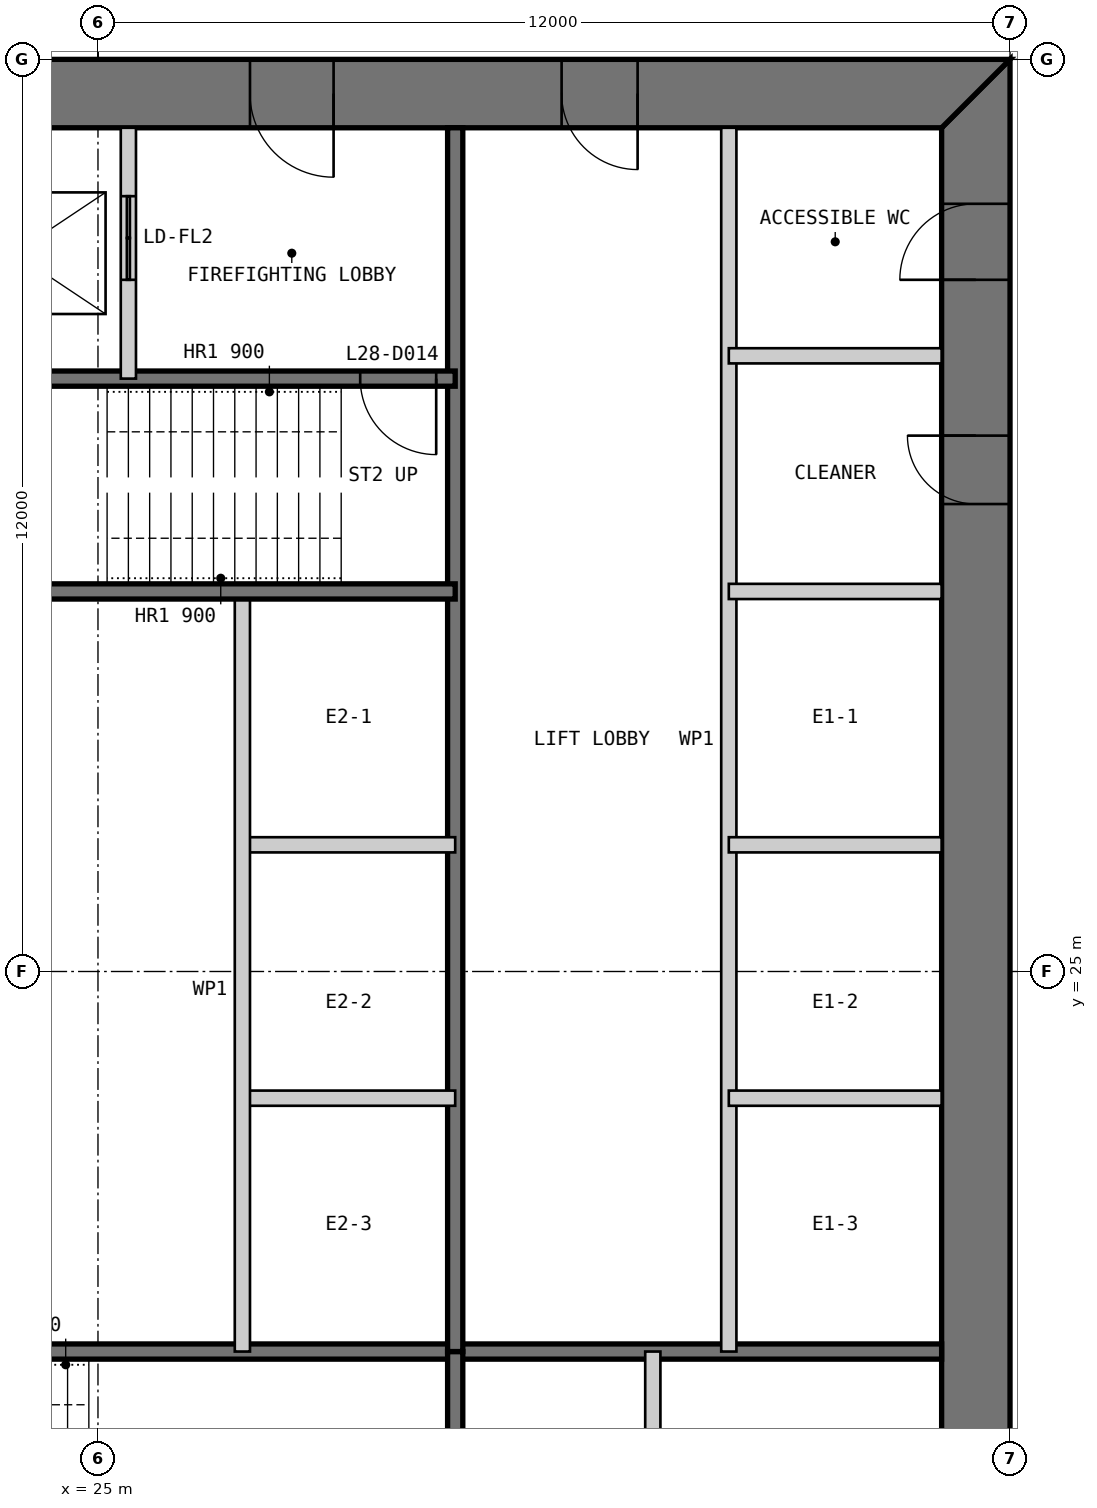
"""IFC4 building model, lengths in metres.
Left out: names, types, materials, properties, quantities, classifications, styles, units other than length and angle.
Written with IfcOpenShell. Run it as: python <this file> out.ifc"""

import sys

from ifc_helpers import new_model, si_unit, direction, frame, frame_2d, origin, place, context, subcontext, project, spatial, polyline, rectangle, outline, extrude, element, fill, save


model = new_model("IFC4")
c1 = context("Model", 3, precision=1e-05, world=origin(), true_north=direction((0.0, 1.0)))
c2 = subcontext(c1, "Body", "Model", "MODEL_VIEW")
j1 = project(units=[si_unit("LENGTHUNIT", "METRE"), si_unit("PLANEANGLEUNIT", "RADIAN")], contexts=[c1])
p1 = place(None, origin())
s1 = spatial("IfcSite", under=j1, at=p1, CompositionType="ELEMENT")
p2 = place(p1, origin())
s2 = spatial("IfcBuilding", under=s1, at=p2, CompositionType="ELEMENT")
p3 = place(p2, frame((0.0, 0.0, 122.4)))
s3 = spatial("IfcBuildingStorey", under=s2, at=p3, CompositionType="ELEMENT", Elevation=122.4)
p4 = place(p3, frame((36.55, 13.9, 0.0), z_axis=(0.0, 0.0, 1.0), x_axis=(0.0, 1.0, 0.0)))
e1 = element("IfcWall", 1, at=p4, inside=s3, PredefinedType="SHEAR", context=c2, shape_type="SweptSolid", body=[
    extrude(outline(polyline([(-0.9, -0.45), (23.1, -0.45), (22.2, 0.45), (0.0, 0.45), (-0.9, -0.45)])), origin(), (0.0, 0.0, 1.0), 4.0),
])
p5 = place(p4, frame((20.2, 0.0, 0.0)))
e2 = element("IfcOpeningElement", 2, at=p5, cuts=e1, PredefinedType="OPENING", context=c2, shape_type="SweptSolid", body=[
    extrude(rectangle(XDim=1.0, YDim=2.2, at=frame_2d((0.5, 1.1))), frame((0.0, 0.46, 0.0), z_axis=(0.0, -1.0, 0.0), x_axis=(1.0, 0.0, 0.0)), (0.0, 0.0, 1.0), 0.92),
])
p6 = place(p4, frame((17.25, 0.0, 0.0)))
e3 = element("IfcOpeningElement", 3, at=p6, cuts=e1, PredefinedType="OPENING", context=c2, shape_type="SweptSolid", body=[
    extrude(rectangle(XDim=0.9, YDim=2.2, at=frame_2d((0.45, 1.1))), frame((0.0, 0.46, 0.0), z_axis=(0.0, -1.0, 0.0), x_axis=(1.0, 0.0, 0.0)), (0.0, 0.0, 1.0), 0.92),
])
p7 = place(p3, frame((37.0, 36.55, 0.0), z_axis=(0.0, 0.0, 1.0), x_axis=(-1.0, 0.0, 0.0)))
e4 = element("IfcWall", 4, at=p7, inside=s3, PredefinedType="SHEAR", context=c2, shape_type="SweptSolid", body=[
    extrude(outline(polyline([(0.0, -0.45), (24.0, -0.45), (23.1, 0.45), (0.9, 0.45), (0.0, -0.45)])), origin(), (0.0, 0.0, 1.0), 4.0),
])
p8 = place(p7, frame((4.9, 0.0, 0.0)))
e5 = element("IfcOpeningElement", 5, at=p8, cuts=e4, PredefinedType="OPENING", context=c2, shape_type="SweptSolid", body=[
    extrude(rectangle(XDim=1.0, YDim=2.2, at=frame_2d((0.5, 1.1))), frame((0.0, 0.46, 0.0), z_axis=(0.0, -1.0, 0.0), x_axis=(1.0, 0.0, 0.0)), (0.0, 0.0, 1.0), 0.92),
])
p9 = place(p7, frame((8.9, 0.0, 0.0)))
e6 = element("IfcOpeningElement", 6, at=p9, cuts=e4, PredefinedType="OPENING", context=c2, shape_type="SweptSolid", body=[
    extrude(rectangle(XDim=1.1, YDim=2.2, at=frame_2d((0.55, 1.1))), frame((0.0, 0.46, 0.0), z_axis=(0.0, -1.0, 0.0), x_axis=(1.0, 0.0, 0.0)), (0.0, 0.0, 1.0), 0.92),
])
p10 = place(p7, frame((15.05, 0.0, 0.0)))
e7 = element("IfcOpeningElement", 7, at=p10, cuts=e4, PredefinedType="OPENING", context=c2, shape_type="SweptSolid", body=[
    extrude(rectangle(XDim=0.9, YDim=2.2, at=frame_2d((0.45, 1.1))), frame((0.0, 0.46, 0.0), z_axis=(0.0, -1.0, 0.0), x_axis=(1.0, 0.0, 0.0)), (0.0, 0.0, 1.0), 0.92),
])
p11 = place(p7, frame((17.9, 0.0, 0.0)))
e8 = element("IfcOpeningElement", 8, at=p11, cuts=e4, PredefinedType="OPENING", context=c2, shape_type="SweptSolid", body=[
    extrude(rectangle(XDim=1.0, YDim=2.2, at=frame_2d((0.5, 1.1))), frame((0.0, 0.46, 0.0), z_axis=(0.0, -1.0, 0.0), x_axis=(1.0, 0.0, 0.0)), (0.0, 0.0, 1.0), 0.92),
])
p12 = place(p7, frame((21.4, 0.0, 0.0)))
e9 = element("IfcOpeningElement", 9, at=p12, cuts=e4, PredefinedType="OPENING", context=c2, shape_type="SweptSolid", body=[
    extrude(rectangle(XDim=1.0, YDim=2.2, at=frame_2d((0.5, 1.1))), frame((0.0, 0.46, 0.0), z_axis=(0.0, -1.0, 0.0), x_axis=(1.0, 0.0, 0.0)), (0.0, 0.0, 1.0), 0.92),
])
p13 = place(p3, frame((20.3, 20.0, 0.0), z_axis=(0.0, 0.0, 1.0), x_axis=(1.0, 0.0, 0.0)))
e10 = element("IfcWall", 10, at=p13, inside=s3, PredefinedType="SOLIDWALL", context=c2, shape_type="SweptSolid", body=[
    extrude(rectangle(XDim=15.8, YDim=0.2, at=frame_2d((7.9, 0.0))), origin(), (0.0, 0.0, 1.0), 3.8),
])
p14 = place(p3, frame((29.7, 13.9, 0.0), z_axis=(0.0, 0.0, 1.0), x_axis=(0.0, 1.0, 0.0)))
e11 = element("IfcWall", 11, at=p14, inside=s3, PredefinedType="SOLIDWALL", context=c2, shape_type="SweptSolid", body=[
    extrude(rectangle(XDim=6.1, YDim=0.2, at=frame_2d((3.05, 0.0))), origin(), (0.0, 0.0, 1.0), 3.8),
])
p15 = place(p3, frame((32.3, 13.9, 0.0), z_axis=(0.0, 0.0, 1.0), x_axis=(0.0, 1.0, 0.0)))
e12 = element("IfcWall", 12, at=p15, inside=s3, PredefinedType="PARTITIONING", context=c2, shape_type="SweptSolid", body=[
    extrude(rectangle(XDim=6.1, YDim=0.2, at=frame_2d((3.05, 0.0))), origin(), (0.0, 0.0, 1.0), 3.8),
])
p16 = place(p3, frame((33.3, 36.1, 0.0), z_axis=(0.0, 0.0, 1.0), x_axis=(0.0, -1.0, 0.0)))
e13 = element("IfcWall", 13, at=p16, inside=s3, PredefinedType="PARTITIONING", context=c2, shape_type="SweptSolid", body=[
    extrude(rectangle(XDim=16.1, YDim=0.2, at=frame_2d((8.05, 0.0))), origin(), (0.0, 0.0, 1.0), 3.8),
])
p17 = place(p3, frame((29.7, 36.1, 0.0), z_axis=(0.0, 0.0, 1.0), x_axis=(0.0, -1.0, 0.0)))
e14 = element("IfcWall", 14, at=p17, inside=s3, PredefinedType="SOLIDWALL", context=c2, shape_type="SweptSolid", body=[
    extrude(rectangle(XDim=16.1, YDim=0.2, at=frame_2d((8.05, 0.0))), origin(), (0.0, 0.0, 1.0), 3.8),
])
for number, where, z_axis, x_axis in (
    (15, (36.1, 30.0, 0.0), (0.0, 0.0, 1.0), (-1.0, 0.0, 0.0)),
    (16, (36.1, 26.667, 0.0), (0.0, 0.0, 1.0), (-1.0, 0.0, 0.0)),
    (17, (36.1, 23.333, 0.0), (0.0, 0.0, 1.0), (-1.0, 0.0, 0.0)),
    (18, (29.7, 26.667, 0.0), (0.0, 0.0, 1.0), (-1.0, 0.0, 0.0)),
    (19, (29.7, 23.333, 0.0), (0.0, 0.0, 1.0), (-1.0, 0.0, 0.0)),
):
    element("IfcWall", number, at=place(p3, frame(where, z_axis=z_axis, x_axis=x_axis)), inside=s3, PredefinedType="PARTITIONING", context=c2, shape_type="SweptSolid", body=[
        extrude(rectangle(XDim=2.8, YDim=0.2, at=frame_2d((1.4, 0.0))), origin(), (0.0, 0.0, 1.0), 3.8),
    ])
p18 = place(p3, frame((26.9, 30.0, 0.0), z_axis=(0.0, 0.0, 1.0), x_axis=(0.0, -1.0, 0.0)))
e20 = element("IfcWall", 20, at=p18, inside=s3, PredefinedType="PARTITIONING", context=c2, shape_type="SweptSolid", body=[
    extrude(rectangle(XDim=10.0, YDim=0.2, at=frame_2d((5.0, 0.0))), origin(), (0.0, 0.0, 1.0), 3.8),
])
p19 = place(p3, frame((29.7, 32.8, 0.0), z_axis=(0.0, 0.0, 1.0), x_axis=(-1.0, 0.0, 0.0)))
e21 = element("IfcWall", 21, at=p19, inside=s3, PredefinedType="SOLIDWALL", context=c2, shape_type="SweptSolid", body=[
    extrude(rectangle(XDim=9.4, YDim=0.2, at=frame_2d((4.7, 0.0))), origin(), (0.0, 0.0, 1.0), 3.8),
])
p20 = place(p19, frame((0.25, 0.0, 0.0)))
e22 = element("IfcOpeningElement", 22, at=p20, cuts=e21, PredefinedType="OPENING", context=c2, shape_type="SweptSolid", body=[
    extrude(rectangle(XDim=1.0, YDim=2.2, at=frame_2d((0.5, 1.1))), frame((0.0, 0.11, 0.0), z_axis=(0.0, -1.0, 0.0), x_axis=(1.0, 0.0, 0.0)), (0.0, 0.0, 1.0), 0.22),
])
p21 = place(p3, frame((29.7, 30.0, 0.0), z_axis=(0.0, 0.0, 1.0), x_axis=(-1.0, 0.0, 0.0)))
e23 = element("IfcWall", 23, at=p21, inside=s3, PredefinedType="SOLIDWALL", context=c2, shape_type="SweptSolid", body=[
    extrude(rectangle(XDim=15.8, YDim=0.2, at=frame_2d((7.9, 0.0))), origin(), (0.0, 0.0, 1.0), 3.8),
])
p22 = place(p3, frame((25.4, 36.1, 0.0), z_axis=(0.0, 0.0, 1.0), x_axis=(0.0, -1.0, 0.0)))
e24 = element("IfcWall", 24, at=p22, inside=s3, PredefinedType="PARTITIONING", context=c2, shape_type="SweptSolid", body=[
    extrude(rectangle(XDim=3.3, YDim=0.2, at=frame_2d((1.65, 0.0))), origin(), (0.0, 0.0, 1.0), 3.8),
])
p23 = place(p22, frame((0.9, 0.0, 0.0)))
e25 = element("IfcOpeningElement", 25, at=p23, cuts=e24, PredefinedType="OPENING", context=c2, shape_type="SweptSolid", body=[
    extrude(rectangle(XDim=1.1, YDim=2.2, at=frame_2d((0.55, 1.1))), frame((0.0, 0.11, 0.0), z_axis=(0.0, -1.0, 0.0), x_axis=(1.0, 0.0, 0.0)), (0.0, 0.0, 1.0), 0.22),
])
p24 = place(p3, frame((36.1, 33.1, 0.0), z_axis=(0.0, 0.0, 1.0), x_axis=(-1.0, 0.0, 0.0)))
e26 = element("IfcWall", 26, at=p24, inside=s3, PredefinedType="PARTITIONING", context=c2, shape_type="SweptSolid", body=[
    extrude(rectangle(XDim=2.8, YDim=0.2, at=frame_2d((1.4, 0.0))), origin(), (0.0, 0.0, 1.0), 3.8),
])
p25 = place(p8, origin())
e27 = element("IfcDoor", 27, at=p25, inside=s3, OperationType="SINGLE_SWING_LEFT", PredefinedType="DOOR", context=c2, shape_type="SweptSolid", body=[
    extrude(rectangle(XDim=1.0, YDim=2.2, at=frame_2d((0.5, 1.1))), frame((0.0, 0.025, 0.0), z_axis=(0.0, -1.0, 0.0), x_axis=(1.0, 0.0, 0.0)), (0.0, 0.0, 1.0), 0.05),
    extrude(outline(polyline([(0.0, 0.0), (0.04, 0.0), (0.04, 2.16), (0.96, 2.16), (0.96, 0.0), (1.0, 0.0), (1.0, 2.2), (0.0, 2.2), (0.0, 0.0)])), frame((0.0, 0.3, 0.0), z_axis=(0.0, -1.0, 0.0), x_axis=(1.0, 0.0, 0.0)), (0.0, 0.0, 1.0), 0.6),
])
fill(e5, e27)
p26 = place(p9, origin())
e28 = element("IfcDoor", 28, at=p26, inside=s3, OperationType="SINGLE_SWING_LEFT", PredefinedType="DOOR", context=c2, shape_type="SweptSolid", body=[
    extrude(rectangle(XDim=1.1, YDim=2.2, at=frame_2d((0.55, 1.1))), frame((0.0, 0.025, 0.0), z_axis=(0.0, -1.0, 0.0), x_axis=(1.0, 0.0, 0.0)), (0.0, 0.0, 1.0), 0.05),
    extrude(outline(polyline([(0.0, 0.0), (0.04, 0.0), (0.04, 2.16), (1.06, 2.16), (1.06, 0.0), (1.1, 0.0), (1.1, 2.2), (0.0, 2.2), (0.0, 0.0)])), frame((0.0, 0.3, 0.0), z_axis=(0.0, -1.0, 0.0), x_axis=(1.0, 0.0, 0.0)), (0.0, 0.0, 1.0), 0.6),
])
fill(e6, e28)
p27 = place(p20, origin())
e29 = element("IfcDoor", 29, at=p27, inside=s3, OperationType="SINGLE_SWING_LEFT", PredefinedType="DOOR", context=c2, shape_type="SweptSolid", body=[
    extrude(rectangle(XDim=1.0, YDim=2.2, at=frame_2d((0.5, 1.1))), frame((0.0, 0.025, 0.0), z_axis=(0.0, -1.0, 0.0), x_axis=(1.0, 0.0, 0.0)), (0.0, 0.0, 1.0), 0.05),
])
fill(e22, e29)
p28 = place(p5, origin())
e30 = element("IfcDoor", 30, at=p28, inside=s3, OperationType="SINGLE_SWING_LEFT", PredefinedType="DOOR", context=c2, shape_type="SweptSolid", body=[
    extrude(rectangle(XDim=1.0, YDim=2.2, at=frame_2d((0.5, 1.1))), frame((0.0, 0.025, 0.0), z_axis=(0.0, -1.0, 0.0), x_axis=(1.0, 0.0, 0.0)), (0.0, 0.0, 1.0), 0.05),
    extrude(outline(polyline([(0.0, 0.0), (0.04, 0.0), (0.04, 2.16), (0.96, 2.16), (0.96, 0.0), (1.0, 0.0), (1.0, 2.2), (0.0, 2.2), (0.0, 0.0)])), frame((0.0, 0.3, 0.0), z_axis=(0.0, -1.0, 0.0), x_axis=(1.0, 0.0, 0.0)), (0.0, 0.0, 1.0), 0.6),
])
fill(e2, e30)
p29 = place(p6, origin())
e31 = element("IfcDoor", 31, at=p29, inside=s3, OperationType="SINGLE_SWING_RIGHT", PredefinedType="DOOR", context=c2, shape_type="SweptSolid", body=[
    extrude(rectangle(XDim=0.9, YDim=2.2, at=frame_2d((0.45, 1.1))), frame((0.0, 0.025, 0.0), z_axis=(0.0, -1.0, 0.0), x_axis=(1.0, 0.0, 0.0)), (0.0, 0.0, 1.0), 0.05),
    extrude(outline(polyline([(0.0, 0.0), (0.04, 0.0), (0.04, 2.16), (0.86, 2.16), (0.86, 0.0), (0.9, 0.0), (0.9, 2.2), (0.0, 2.2), (0.0, 0.0)])), frame((0.0, 0.3, 0.0), z_axis=(0.0, -1.0, 0.0), x_axis=(1.0, 0.0, 0.0)), (0.0, 0.0, 1.0), 0.6),
])
fill(e3, e31)
p30 = place(p23, origin())
e32 = element("IfcDoor", 32, at=p30, inside=s3, OperationType="DOUBLE_DOOR_SLIDING", PredefinedType="DOOR", context=c2, shape_type="SweptSolid", body=[
    extrude(rectangle(XDim=1.1, YDim=2.2, at=frame_2d((0.55, 1.1))), frame((0.0, 0.025, 0.0), z_axis=(0.0, -1.0, 0.0), x_axis=(1.0, 0.0, 0.0)), (0.0, 0.0, 1.0), 0.05),
])
fill(e25, e32)
save(model, sys.argv[1])
